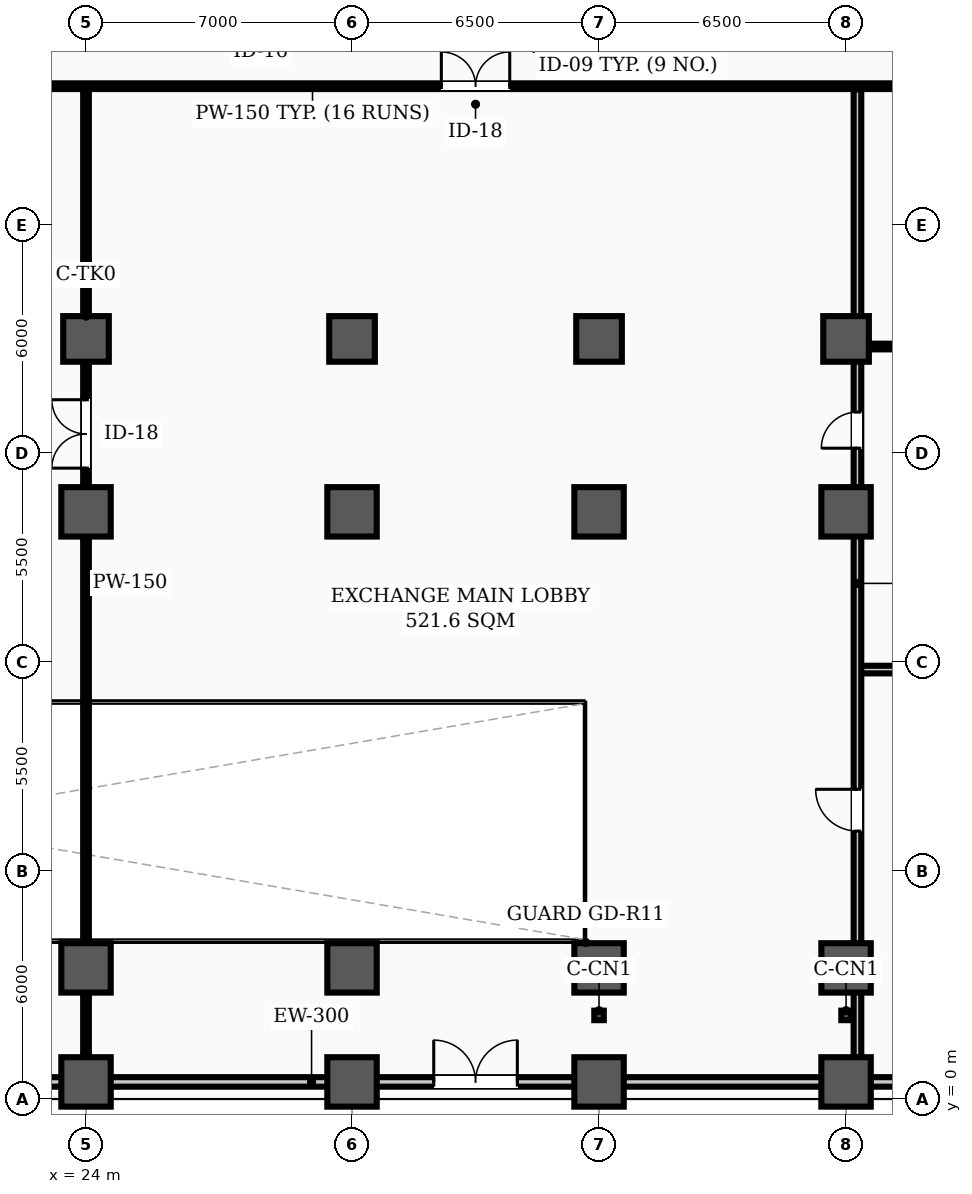
"""IFC4 building model, lengths in metres.
Left out: names, types, materials, properties, quantities, classifications, styles, units other than length and angle.
Written with IfcOpenShell. Run it as: python <this file> out.ifc"""

import sys

from ifc_helpers import new_model, si_unit, direction, frame, frame_2d, origin, origin_2d, place, context, subcontext, project, spatial, rectangle, hollow_rectangle, extrude, element, fill, save


model = new_model("IFC4")
c1 = context("Model", 3, precision=1e-05, world=origin(), true_north=direction((0.0, 1.0)))
c2 = subcontext(c1, "Body", "Model", "MODEL_VIEW")
j1 = project(units=[si_unit("LENGTHUNIT", "METRE"), si_unit("PLANEANGLEUNIT", "RADIAN")], contexts=[c1])
p1 = place(None, origin())
s1 = spatial("IfcSite", under=j1, at=p1, CompositionType="ELEMENT")
p2 = place(p1, origin())
s2 = spatial("IfcBuilding", under=s1, at=p2, CompositionType="ELEMENT")
p3 = place(p2, origin())
s3 = spatial("IfcBuildingStorey", under=s2, at=p3, CompositionType="ELEMENT", Elevation=0.0)
for number, where, z_axis, x_axis in (
    (1, (24.0, 20.0, 0.0), (0.0, 0.0, 1.0), (1.0, 0.0, 0.0)),
    (2, (31.0, 20.0, 0.0), (0.0, 0.0, 1.0), (1.0, 0.0, 0.0)),
    (3, (37.5, 20.0, 0.0), (0.0, 0.0, 1.0), (1.0, 0.0, 0.0)),
    (4, (44.0, 20.0, 0.0), (0.0, 0.0, 1.0), (1.0, 0.0, 0.0)),
):
    element("IfcColumn", number, at=place(p3, frame(where, z_axis=z_axis, x_axis=x_axis)), inside=s3, PredefinedType="COLUMN", context=c2, shape_type="SweptSolid", body=[
        extrude(hollow_rectangle(XDim=1.2, YDim=1.2, WallThickness=0.04, InnerFilletRadius=0.02, OuterFilletRadius=0.06, at=origin_2d()), origin(), (0.0, 0.0, 1.0), 5.8),
    ])
for number, where, z_axis, x_axis in (
    (5, (24.0, 0.45, 0.0), (0.0, 0.0, 1.0), (1.0, 0.0, 0.0)),
    (6, (24.0, 3.45, 0.0), (0.0, 0.0, 1.0), (1.0, 0.0, 0.0)),
    (7, (24.0, 15.45, 0.0), (0.0, 0.0, 1.0), (1.0, 0.0, 0.0)),
    (8, (31.0, 0.45, 0.0), (0.0, 0.0, 1.0), (1.0, 0.0, 0.0)),
    (9, (31.0, 3.45, 0.0), (0.0, 0.0, 1.0), (1.0, 0.0, 0.0)),
    (10, (31.0, 15.45, 0.0), (0.0, 0.0, 1.0), (1.0, 0.0, 0.0)),
    (11, (37.5, 0.45, 0.0), (0.0, 0.0, 1.0), (1.0, 0.0, 0.0)),
    (12, (37.5, 3.45, 0.0), (0.0, 0.0, 1.0), (1.0, 0.0, 0.0)),
    (13, (37.5, 15.45, 0.0), (0.0, 0.0, 1.0), (1.0, 0.0, 0.0)),
    (14, (44.0, 0.45, 0.0), (0.0, 0.0, 1.0), (1.0, 0.0, 0.0)),
    (15, (44.0, 3.45, 0.0), (0.0, 0.0, 1.0), (1.0, 0.0, 0.0)),
    (16, (44.0, 15.45, 0.0), (0.0, 0.0, 1.0), (1.0, 0.0, 0.0)),
):
    element("IfcColumn", number, at=place(p3, frame(where, z_axis=z_axis, x_axis=x_axis)), inside=s3, PredefinedType="COLUMN", context=c2, shape_type="SweptSolid", body=[
        extrude(rectangle(XDim=1.3, YDim=1.3, at=origin_2d()), origin(), (0.0, 0.0, 1.0), 5.8),
    ])
for number, where, z_axis, x_axis in (
    (17, (37.5, 2.2, 0.0), (0.0, 0.0, 1.0), (1.0, 0.0, 0.0)),
    (18, (44.0, 2.2, 0.0), (0.0, 0.0, 1.0), (1.0, 0.0, 0.0)),
):
    element("IfcColumn", number, at=place(p3, frame(where, z_axis=z_axis, x_axis=x_axis)), inside=s3, PredefinedType="COLUMN", context=c2, shape_type="SweptSolid", body=[
        extrude(hollow_rectangle(XDim=0.25, YDim=0.25, WallThickness=0.01, InnerFilletRadius=0.01, OuterFilletRadius=0.02, at=origin_2d()), origin(), (0.0, 0.0, 1.0), 4.2),
    ])
p4 = place(p3, frame((0.45, 0.45, 0.0), z_axis=(0.0, 0.0, 1.0), x_axis=(1.0, 0.0, 0.0)))
e19 = element("IfcWall", 19, at=p4, inside=s3, PredefinedType="STANDARD", context=c2, shape_type="SweptSolid", body=[
    extrude(rectangle(XDim=58.97, YDim=0.25, at=frame_2d((29.485, 0.0))), origin(), (0.0, 0.0, 1.0), 4.75),
])
p5 = place(p4, frame((6.45, 0.0, 0.0)))
e20 = element("IfcOpeningElement", 20, at=p5, cuts=e19, PredefinedType="OPENING", context=c2, shape_type="SweptSolid", body=[
    extrude(rectangle(XDim=2.2, YDim=2.4, at=frame_2d((1.1, 1.2))), frame((0.0, 0.135, 0.0), z_axis=(0.0, -1.0, 0.0), x_axis=(1.0, 0.0, 0.0)), (0.0, 0.0, 1.0), 0.27),
])
p6 = place(p4, frame((17.25, 0.0, 0.0)))
e21 = element("IfcOpeningElement", 21, at=p6, cuts=e19, PredefinedType="OPENING", context=c2, shape_type="SweptSolid", body=[
    extrude(rectangle(XDim=2.2, YDim=2.4, at=frame_2d((1.1, 1.2))), frame((0.0, 0.135, 0.0), z_axis=(0.0, -1.0, 0.0), x_axis=(1.0, 0.0, 0.0)), (0.0, 0.0, 1.0), 0.27),
])
p7 = place(p4, frame((32.7, 0.0, 0.0)))
e22 = element("IfcOpeningElement", 22, at=p7, cuts=e19, PredefinedType="OPENING", context=c2, shape_type="SweptSolid", body=[
    extrude(rectangle(XDim=2.2, YDim=2.4, at=frame_2d((1.1, 1.2))), frame((0.0, 0.135, 0.0), z_axis=(0.0, -1.0, 0.0), x_axis=(1.0, 0.0, 0.0)), (0.0, 0.0, 1.0), 0.27),
])
p8 = place(p3, frame((0.57, 26.65, 0.0), z_axis=(0.0, 0.0, 1.0), x_axis=(1.0, 0.0, 0.0)))
e23 = element("IfcWall", 23, at=p8, inside=s3, PredefinedType="PARTITIONING", context=c2, shape_type="SweptSolid", body=[
    extrude(rectangle(XDim=58.78, YDim=0.15, at=frame_2d((29.39, 0.0))), origin(), (0.0, 0.0, 1.0), 4.83),
])
p9 = place(p8, frame((17.33, 0.0, 0.0)))
e24 = element("IfcOpeningElement", 24, at=p9, cuts=e23, PredefinedType="OPENING", context=c2, shape_type="SweptSolid", body=[
    extrude(rectangle(XDim=1.8, YDim=2.08, at=frame_2d((0.9, 1.04))), frame((0.0, 0.085, 0.0), z_axis=(0.0, -1.0, 0.0), x_axis=(1.0, 0.0, 0.0)), (0.0, 0.0, 1.0), 0.17),
])
p10 = place(p8, frame((32.78, 0.0, 0.0)))
e25 = element("IfcOpeningElement", 25, at=p10, cuts=e23, PredefinedType="OPENING", context=c2, shape_type="SweptSolid", body=[
    extrude(rectangle(XDim=1.8, YDim=2.08, at=frame_2d((0.9, 1.04))), frame((0.0, 0.085, 0.0), z_axis=(0.0, -1.0, 0.0), x_axis=(1.0, 0.0, 0.0)), (0.0, 0.0, 1.0), 0.17),
])
p11 = place(p8, frame((46.555, 0.0, 0.0)))
e26 = element("IfcOpeningElement", 26, at=p11, cuts=e23, PredefinedType="OPENING", context=c2, shape_type="SweptSolid", body=[
    extrude(rectangle(XDim=0.95, YDim=2.08, at=frame_2d((0.475, 1.04))), frame((0.0, 0.085, 0.0), z_axis=(0.0, -1.0, 0.0), x_axis=(1.0, 0.0, 0.0)), (0.0, 0.0, 1.0), 0.17),
])
p12 = place(p8, frame((51.105, 0.0, 0.0)))
e27 = element("IfcOpeningElement", 27, at=p12, cuts=e23, PredefinedType="OPENING", context=c2, shape_type="SweptSolid", body=[
    extrude(rectangle(XDim=0.95, YDim=2.08, at=frame_2d((0.475, 1.04))), frame((0.0, 0.085, 0.0), z_axis=(0.0, -1.0, 0.0), x_axis=(1.0, 0.0, 0.0)), (0.0, 0.0, 1.0), 0.17),
])
p13 = place(p8, frame((55.355, 0.0, 0.0)))
e28 = element("IfcOpeningElement", 28, at=p13, cuts=e23, PredefinedType="OPENING", context=c2, shape_type="SweptSolid", body=[
    extrude(rectangle(XDim=0.95, YDim=2.08, at=frame_2d((0.475, 1.04))), frame((0.0, 0.085, 0.0), z_axis=(0.0, -1.0, 0.0), x_axis=(1.0, 0.0, 0.0)), (0.0, 0.0, 1.0), 0.17),
])
p14 = place(p3, frame((44.3, 11.3, 0.0), z_axis=(0.0, 0.0, 1.0), x_axis=(1.0, 0.0, 0.0)))
e29 = element("IfcWall", 29, at=p14, inside=s3, PredefinedType="STANDARD", context=c2, shape_type="SweptSolid", body=[
    extrude(rectangle(XDim=15.05, YDim=0.2, at=frame_2d((7.525, 0.0))), origin(), (0.0, 0.0, 1.0), 4.83),
])
p15 = place(p3, frame((44.3, 19.8, 0.0), z_axis=(0.0, 0.0, 1.0), x_axis=(1.0, 0.0, 0.0)))
e30 = element("IfcWall", 30, at=p15, inside=s3, PredefinedType="PARTITIONING", context=c2, shape_type="SweptSolid", body=[
    extrude(rectangle(XDim=15.05, YDim=0.15, at=frame_2d((7.525, 0.0))), origin(), (0.0, 0.0, 1.0), 4.73),
])
p16 = place(p3, frame((24.0, 0.57, 0.0), z_axis=(0.0, 0.0, 1.0), x_axis=(0.0, 1.0, 0.0)))
e31 = element("IfcWall", 31, at=p16, inside=s3, PredefinedType="PARTITIONING", context=c2, shape_type="SweptSolid", body=[
    extrude(rectangle(XDim=25.995, YDim=0.15, at=frame_2d((12.998, 0.0))), origin(), (0.0, 0.0, 1.0), 4.73),
])
p17 = place(p16, frame((16.03, 0.0, 0.0)))
e32 = element("IfcOpeningElement", 32, at=p17, cuts=e31, PredefinedType="OPENING", context=c2, shape_type="SweptSolid", body=[
    extrude(rectangle(XDim=1.8, YDim=2.08, at=frame_2d((0.9, 1.04))), frame((0.0, 0.085, 0.0), z_axis=(0.0, -1.0, 0.0), x_axis=(1.0, 0.0, 0.0)), (0.0, 0.0, 1.0), 0.17),
])
p18 = place(p3, frame((44.3, 0.57, 0.0), z_axis=(0.0, 0.0, 1.0), x_axis=(0.0, 1.0, 0.0)))
e33 = element("IfcWall", 33, at=p18, inside=s3, PredefinedType="STANDARD", context=c2, shape_type="SweptSolid", body=[
    extrude(rectangle(XDim=25.995, YDim=0.2, at=frame_2d((12.998, 0.0))), origin(), (0.0, 0.0, 1.0), 3.9),
])
p19 = place(p18, frame((6.48, 0.0, 0.0)))
e34 = element("IfcOpeningElement", 34, at=p19, cuts=e33, PredefinedType="OPENING", context=c2, shape_type="SweptSolid", body=[
    extrude(rectangle(XDim=1.1, YDim=2.08, at=frame_2d((0.55, 1.04))), frame((0.0, 0.11, 0.0), z_axis=(0.0, -1.0, 0.0), x_axis=(1.0, 0.0, 0.0)), (0.0, 0.0, 1.0), 0.22),
])
p20 = place(p18, frame((16.555, 0.0, 0.0)))
e35 = element("IfcOpeningElement", 35, at=p20, cuts=e33, PredefinedType="OPENING", context=c2, shape_type="SweptSolid", body=[
    extrude(rectangle(XDim=0.95, YDim=2.08, at=frame_2d((0.475, 1.04))), frame((0.0, 0.11, 0.0), z_axis=(0.0, -1.0, 0.0), x_axis=(1.0, 0.0, 0.0)), (0.0, 0.0, 1.0), 0.22),
])
p21 = place(p7, frame((2.2, 0.0, 0.0), z_axis=(0.0, 0.0, 1.0), x_axis=(-1.0, 0.0, 0.0)))
e36 = element("IfcDoor", 36, at=p21, inside=s3, OperationType="DOUBLE_DOOR_SINGLE_SWING", PredefinedType="DOOR", context=c2, shape_type="SweptSolid", body=[
    extrude(rectangle(XDim=2.2, YDim=2.4, at=frame_2d((1.1, 1.2))), frame((0.0, 0.025, 0.0), z_axis=(0.0, -1.0, 0.0), x_axis=(1.0, 0.0, 0.0)), (0.0, 0.0, 1.0), 0.05),
])
fill(e22, e36)
p22 = place(p10, origin())
e37 = element("IfcDoor", 37, at=p22, inside=s3, OperationType="DOUBLE_DOOR_SINGLE_SWING", PredefinedType="DOOR", context=c2, shape_type="SweptSolid", body=[
    extrude(rectangle(XDim=1.8, YDim=2.08, at=frame_2d((0.9, 1.04))), frame((0.0, 0.025, 0.0), z_axis=(0.0, -1.0, 0.0), x_axis=(1.0, 0.0, 0.0)), (0.0, 0.0, 1.0), 0.05),
])
fill(e25, e37)
p23 = place(p17, origin())
e38 = element("IfcDoor", 38, at=p23, inside=s3, OperationType="DOUBLE_DOOR_SINGLE_SWING", PredefinedType="DOOR", context=c2, shape_type="SweptSolid", body=[
    extrude(rectangle(XDim=1.8, YDim=2.08, at=frame_2d((0.9, 1.04))), frame((0.0, 0.025, 0.0), z_axis=(0.0, -1.0, 0.0), x_axis=(1.0, 0.0, 0.0)), (0.0, 0.0, 1.0), 0.05),
])
fill(e32, e38)
p24 = place(p19, origin())
e39 = element("IfcDoor", 39, at=p24, inside=s3, OperationType="SINGLE_SWING_RIGHT", PredefinedType="DOOR", context=c2, shape_type="SweptSolid", body=[
    extrude(rectangle(XDim=1.1, YDim=2.08, at=frame_2d((0.55, 1.04))), frame((0.0, 0.025, 0.0), z_axis=(0.0, -1.0, 0.0), x_axis=(1.0, 0.0, 0.0)), (0.0, 0.0, 1.0), 0.05),
])
fill(e34, e39)
p25 = place(p20, origin())
e40 = element("IfcDoor", 40, at=p25, inside=s3, OperationType="SINGLE_SWING_LEFT", PredefinedType="DOOR", context=c2, shape_type="SweptSolid", body=[
    extrude(rectangle(XDim=0.95, YDim=2.08, at=frame_2d((0.475, 1.04))), frame((0.0, 0.025, 0.0), z_axis=(0.0, -1.0, 0.0), x_axis=(1.0, 0.0, 0.0)), (0.0, 0.0, 1.0), 0.05),
])
fill(e35, e40)
save(model, sys.argv[1])
